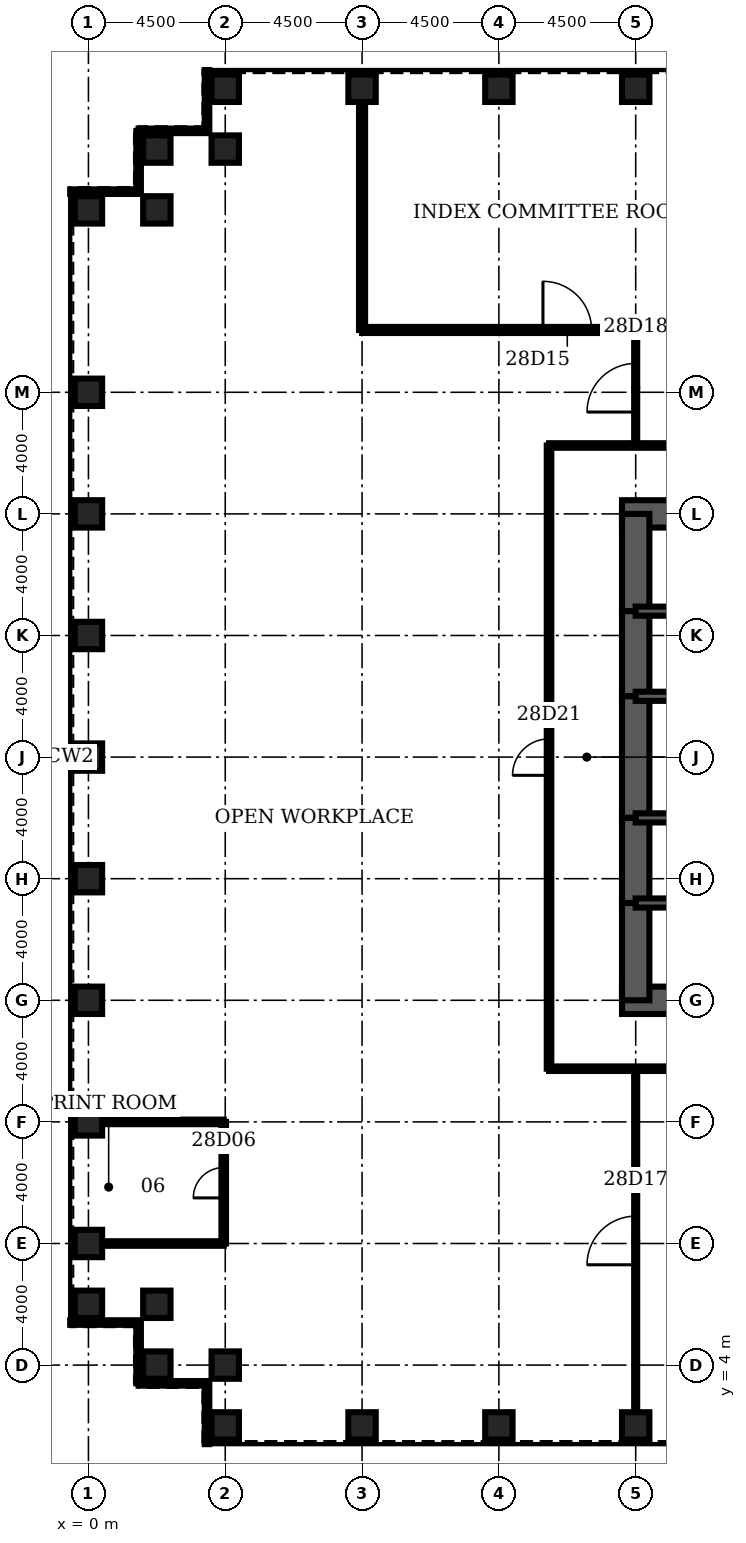
"""IFC4 building model, lengths in metres.
Left out: names, types, materials, properties, quantities, classifications, styles, units other than length and angle.
Written with IfcOpenShell. Run it as: python <this file> out.ifc"""

import sys

from ifc_helpers import new_model, si_unit, direction, frame, frame_2d, origin, origin_2d, place, context, subcontext, project, spatial, rectangle, hollow_rectangle, extrude, element, fill, save


model = new_model("IFC4")
c1 = context("Model", 3, precision=1e-05, world=origin(), true_north=direction((0.0, 1.0)))
c2 = subcontext(c1, "Body", "Model", "MODEL_VIEW")
j1 = project(units=[si_unit("LENGTHUNIT", "METRE"), si_unit("PLANEANGLEUNIT", "RADIAN")], contexts=[c1])
p1 = place(None, origin())
s1 = spatial("IfcSite", under=j1, at=p1, CompositionType="ELEMENT")
p2 = place(p1, origin())
s2 = spatial("IfcBuilding", under=s1, at=p2, CompositionType="ELEMENT")
p3 = place(p2, frame((0.0, 0.0, 129.9)))
s3 = spatial("IfcBuildingStorey", under=s2, at=p3, CompositionType="ELEMENT", Elevation=129.9)
for number, where, z_axis, x_axis in (
    (1, (4.5, 2.0, 0.0), (0.0, 0.0, 1.0), (0.0, 1.0, 0.0)),
    (2, (9.0, 2.0, 0.0), (0.0, 0.0, 1.0), (0.0, 1.0, 0.0)),
    (3, (13.5, 2.0, 0.0), (0.0, 0.0, 1.0), (0.0, 1.0, 0.0)),
    (4, (18.0, 2.0, 0.0), (0.0, 0.0, 1.0), (0.0, 1.0, 0.0)),
    (5, (18.0, 46.0, 0.0), (0.0, 0.0, 1.0), (0.0, 1.0, 0.0)),
    (6, (13.5, 46.0, 0.0), (0.0, 0.0, 1.0), (0.0, 1.0, 0.0)),
    (7, (9.0, 46.0, 0.0), (0.0, 0.0, 1.0), (0.0, 1.0, 0.0)),
    (8, (4.5, 46.0, 0.0), (0.0, 0.0, 1.0), (0.0, 1.0, 0.0)),
    (9, (4.5, 44.0, 0.0), (0.0, 0.0, 1.0), (0.0, 1.0, 0.0)),
    (10, (2.25, 44.0, 0.0), (0.0, 0.0, 1.0), (1.0, 0.0, 0.0)),
    (11, (2.25, 42.0, 0.0), (0.0, 0.0, 1.0), (1.0, 0.0, 0.0)),
    (12, (0.0, 42.0, 0.0), (0.0, 0.0, 1.0), (1.0, 0.0, 0.0)),
    (13, (0.0, 36.0, 0.0), (0.0, 0.0, 1.0), (1.0, 0.0, 0.0)),
    (14, (0.0, 32.0, 0.0), (0.0, 0.0, 1.0), (1.0, 0.0, 0.0)),
    (15, (0.0, 28.0, 0.0), (0.0, 0.0, 1.0), (1.0, 0.0, 0.0)),
    (16, (0.0, 24.0, 0.0), (0.0, 0.0, 1.0), (1.0, 0.0, 0.0)),
    (17, (0.0, 20.0, 0.0), (0.0, 0.0, 1.0), (1.0, 0.0, 0.0)),
    (18, (0.0, 16.0, 0.0), (0.0, 0.0, 1.0), (1.0, 0.0, 0.0)),
    (19, (0.0, 12.0, 0.0), (0.0, 0.0, 1.0), (1.0, 0.0, 0.0)),
    (20, (0.0, 8.0, 0.0), (0.0, 0.0, 1.0), (1.0, 0.0, 0.0)),
    (21, (0.0, 6.0, 0.0), (0.0, 0.0, 1.0), (1.0, 0.0, 0.0)),
    (22, (2.25, 6.0, 0.0), (0.0, 0.0, 1.0), (1.0, 0.0, 0.0)),
    (23, (2.25, 4.0, 0.0), (0.0, 0.0, 1.0), (1.0, 0.0, 0.0)),
    (24, (4.5, 4.0, 0.0), (0.0, 0.0, 1.0), (0.0, 1.0, 0.0)),
):
    element("IfcColumn", number, at=place(p3, frame(where, z_axis=z_axis, x_axis=x_axis)), inside=s3, PredefinedType="COLUMN", context=c2, shape_type="SweptSolid", body=[
        extrude(hollow_rectangle(XDim=0.9, YDim=0.9, WallThickness=0.1, at=origin_2d()), origin(), (0.0, 0.0, 1.0), 4.2),
    ])
for number, where, z_axis, x_axis in (
    (25, (17.55, 16.0, 0.0), (0.0, 0.0, 1.0), (1.0, 0.0, 0.0)),
    (26, (27.0, 32.0, 0.0), (0.0, 0.0, 1.0), (-1.0, 0.0, 0.0)),
):
    element("IfcWall", number, at=place(p3, frame(where, z_axis=z_axis, x_axis=x_axis)), inside=s3, PredefinedType="SHEAR", context=c2, shape_type="SweptSolid", body=[
        extrude(rectangle(XDim=9.45, YDim=0.9, at=frame_2d((4.725, 0.0))), origin(), (0.0, 0.0, 1.0), 4.2),
    ])
p4 = place(p3, frame((18.0, 32.0, 0.0), z_axis=(0.0, 0.0, 1.0), x_axis=(0.0, -1.0, 0.0)))
e27 = element("IfcWall", 27, at=p4, inside=s3, PredefinedType="SHEAR", context=c2, shape_type="SweptSolid", body=[
    extrude(rectangle(XDim=3.2, YDim=0.9, at=frame_2d((1.6, 0.0))), origin(), (0.0, 0.0, 1.0), 4.2),
])
p5 = place(p3, frame((18.0, 28.8, 0.0), z_axis=(0.0, 0.0, 1.0), x_axis=(0.0, -1.0, 0.0)))
e28 = element("IfcWall", 28, at=p5, inside=s3, PredefinedType="SHEAR", context=c2, shape_type="SweptSolid", body=[
    extrude(rectangle(XDim=2.8, YDim=0.9, at=frame_2d((1.4, 0.0))), origin(), (0.0, 0.0, 1.0), 4.2),
])
p6 = place(p5, frame((0.4, 0.0, 0.0)))
e29 = element("IfcOpeningElement", 29, at=p6, cuts=e28, PredefinedType="OPENING", context=c2, shape_type="SweptSolid", body=[
    extrude(rectangle(XDim=1.8, YDim=2.1, at=frame_2d((0.9, 1.05))), frame((0.0, 0.46, 0.0), z_axis=(0.0, -1.0, 0.0), x_axis=(1.0, 0.0, 0.0)), (0.0, 0.0, 1.0), 0.92),
])
p7 = place(p3, frame((18.0, 26.0, 0.0), z_axis=(0.0, 0.0, 1.0), x_axis=(0.0, -1.0, 0.0)))
e30 = element("IfcWall", 30, at=p7, inside=s3, PredefinedType="SHEAR", context=c2, shape_type="SweptSolid", body=[
    extrude(rectangle(XDim=4.0, YDim=0.9, at=frame_2d((2.0, 0.0))), origin(), (0.0, 0.0, 1.0), 4.2),
])
p8 = place(p3, frame((18.0, 22.0, 0.0), z_axis=(0.0, 0.0, 1.0), x_axis=(0.0, -1.0, 0.0)))
e31 = element("IfcWall", 31, at=p8, inside=s3, PredefinedType="SHEAR", context=c2, shape_type="SweptSolid", body=[
    extrude(rectangle(XDim=2.8, YDim=0.9, at=frame_2d((1.4, 0.0))), origin(), (0.0, 0.0, 1.0), 4.2),
])
p9 = place(p8, frame((0.6, 0.0, 0.0)))
e32 = element("IfcOpeningElement", 32, at=p9, cuts=e31, PredefinedType="OPENING", context=c2, shape_type="SweptSolid", body=[
    extrude(rectangle(XDim=1.8, YDim=2.1, at=frame_2d((0.9, 1.05))), frame((0.0, 0.46, 0.0), z_axis=(0.0, -1.0, 0.0), x_axis=(1.0, 0.0, 0.0)), (0.0, 0.0, 1.0), 0.92),
])
p10 = place(p3, frame((18.0, 19.2, 0.0), z_axis=(0.0, 0.0, 1.0), x_axis=(0.0, -1.0, 0.0)))
e33 = element("IfcWall", 33, at=p10, inside=s3, PredefinedType="SHEAR", context=c2, shape_type="SweptSolid", body=[
    extrude(rectangle(XDim=3.2, YDim=0.9, at=frame_2d((1.6, 0.0))), origin(), (0.0, 0.0, 1.0), 4.2),
])
p11 = place(p3, frame((18.0, 19.2, 0.0), z_axis=(0.0, 0.0, 1.0), x_axis=(1.0, 0.0, 0.0)))
e34 = element("IfcWall", 34, at=p11, inside=s3, PredefinedType="SOLIDWALL", context=c2, shape_type="SweptSolid", body=[
    extrude(rectangle(XDim=9.0, YDim=0.3, at=frame_2d((4.5, 0.0))), origin(), (0.0, 0.0, 1.0), 4.2),
])
p12 = place(p11, frame((0.65, 0.0, 0.0)))
e35 = element("IfcOpeningElement", 35, at=p12, cuts=e34, PredefinedType="OPENING", context=c2, shape_type="SweptSolid", body=[
    extrude(rectangle(XDim=1.0, YDim=2.1, at=frame_2d((0.5, 1.05))), frame((0.0, 0.16, 0.0), z_axis=(0.0, -1.0, 0.0), x_axis=(1.0, 0.0, 0.0)), (0.0, 0.0, 1.0), 0.32),
])
p13 = place(p3, frame((18.0, 28.8, 0.0), z_axis=(0.0, 0.0, 1.0), x_axis=(1.0, 0.0, 0.0)))
e36 = element("IfcWall", 36, at=p13, inside=s3, PredefinedType="SOLIDWALL", context=c2, shape_type="SweptSolid", body=[
    extrude(rectangle(XDim=9.0, YDim=0.3, at=frame_2d((4.5, 0.0))), origin(), (0.0, 0.0, 1.0), 4.2),
])
p14 = place(p13, frame((0.65, 0.0, 0.0)))
e37 = element("IfcOpeningElement", 37, at=p14, cuts=e36, PredefinedType="OPENING", context=c2, shape_type="SweptSolid", body=[
    extrude(rectangle(XDim=1.0, YDim=2.1, at=frame_2d((0.5, 1.05))), frame((0.0, 0.16, 0.0), z_axis=(0.0, -1.0, 0.0), x_axis=(1.0, 0.0, 0.0)), (0.0, 0.0, 1.0), 0.32),
])
p15 = place(p3, frame((18.0, 22.0, 0.0), z_axis=(0.0, 0.0, 1.0), x_axis=(1.0, 0.0, 0.0)))
e38 = element("IfcWall", 38, at=p15, inside=s3, PredefinedType="SOLIDWALL", context=c2, shape_type="SweptSolid", body=[
    extrude(rectangle(XDim=6.0, YDim=0.3, at=frame_2d((3.0, 0.0))), origin(), (0.0, 0.0, 1.0), 4.2),
])
p16 = place(p15, frame((2.0, 0.0, 0.0)))
e39 = element("IfcOpeningElement", 39, at=p16, cuts=e38, PredefinedType="OPENING", context=c2, shape_type="SweptSolid", body=[
    extrude(rectangle(XDim=1.0, YDim=2.1, at=frame_2d((0.5, 1.05))), frame((0.0, 0.16, 0.0), z_axis=(0.0, -1.0, 0.0), x_axis=(1.0, 0.0, 0.0)), (0.0, 0.0, 1.0), 0.32),
])
p17 = place(p3, frame((18.0, 26.0, 0.0), z_axis=(0.0, 0.0, 1.0), x_axis=(1.0, 0.0, 0.0)))
e40 = element("IfcWall", 40, at=p17, inside=s3, PredefinedType="SOLIDWALL", context=c2, shape_type="SweptSolid", body=[
    extrude(rectangle(XDim=6.0, YDim=0.3, at=frame_2d((3.0, 0.0))), origin(), (0.0, 0.0, 1.0), 4.2),
])
for number, where, z_axis, x_axis in (
    (41, (0.45, 8.0, 0.0), (0.0, 0.0, 1.0), (1.0, 0.0, 0.0)),
    (42, (0.45, 12.0, 0.0), (0.0, 0.0, 1.0), (1.0, 0.0, 0.0)),
):
    element("IfcWall", number, at=place(p3, frame(where, z_axis=z_axis, x_axis=x_axis)), inside=s3, PredefinedType="PARTITIONING", context=c2, shape_type="SweptSolid", body=[
        extrude(rectangle(XDim=4.0, YDim=0.15, at=frame_2d((2.0, 0.0))), origin(), (0.0, 0.0, 1.0), 3.0),
    ])
p18 = place(p3, frame((15.15, 13.75, 0.0), z_axis=(0.0, 0.0, 1.0), x_axis=(1.0, 0.0, 0.0)))
e43 = element("IfcWall", 43, at=p18, inside=s3, PredefinedType="PARTITIONING", context=c2, shape_type="SweptSolid", body=[
    extrude(rectangle(XDim=6.85, YDim=0.15, at=frame_2d((3.425, 0.0))), origin(), (0.0, 0.0, 1.0), 3.0),
])
p19 = place(p3, frame((15.15, 34.25, 0.0), z_axis=(0.0, 0.0, 1.0), x_axis=(1.0, 0.0, 0.0)))
e44 = element("IfcWall", 44, at=p19, inside=s3, PredefinedType="PARTITIONING", context=c2, shape_type="SweptSolid", body=[
    extrude(rectangle(XDim=41.7, YDim=0.15, at=frame_2d((20.85, 0.0))), origin(), (0.0, 0.0, 1.0), 3.0),
])
p20 = place(p19, frame((16.225, 0.0, 0.0)))
e45 = element("IfcOpeningElement", 45, at=p20, cuts=e44, PredefinedType="OPENING", context=c2, shape_type="SweptSolid", body=[
    extrude(rectangle(XDim=1.2, YDim=2.1, at=frame_2d((0.6, 1.05))), frame((0.0, 0.085, 0.0), z_axis=(0.0, -1.0, 0.0), x_axis=(1.0, 0.0, 0.0)), (0.0, 0.0, 1.0), 0.17),
])
p21 = place(p3, frame((9.0, 38.05, 0.0), z_axis=(0.0, 0.0, 1.0), x_axis=(1.0, 0.0, 0.0)))
e46 = element("IfcWall", 46, at=p21, inside=s3, PredefinedType="PARTITIONING", context=c2, shape_type="SweptSolid", body=[
    extrude(rectangle(XDim=13.5, YDim=0.2, at=frame_2d((6.75, 0.0))), origin(), (0.0, 0.0, 1.0), 3.0),
])
p22 = place(p21, frame((5.95, 0.0, 0.0)))
e47 = element("IfcOpeningElement", 47, at=p22, cuts=e46, PredefinedType="OPENING", context=c2, shape_type="SweptSolid", body=[
    extrude(rectangle(XDim=1.6, YDim=2.1, at=frame_2d((0.8, 1.05))), frame((0.0, 0.11, 0.0), z_axis=(0.0, -1.0, 0.0), x_axis=(1.0, 0.0, 0.0)), (0.0, 0.0, 1.0), 0.22),
])
p23 = place(p3, frame((4.45, 8.0, 0.0), z_axis=(0.0, 0.0, 1.0), x_axis=(0.0, 1.0, 0.0)))
e48 = element("IfcWall", 48, at=p23, inside=s3, PredefinedType="PARTITIONING", context=c2, shape_type="SweptSolid", body=[
    extrude(rectangle(XDim=4.0, YDim=0.15, at=frame_2d((2.0, 0.0))), origin(), (0.0, 0.0, 1.0), 3.0),
])
p24 = place(p23, frame((1.5, 0.0, 0.0)))
e49 = element("IfcOpeningElement", 49, at=p24, cuts=e48, PredefinedType="OPENING", context=c2, shape_type="SweptSolid", body=[
    extrude(rectangle(XDim=1.0, YDim=2.1, at=frame_2d((0.5, 1.05))), frame((0.0, 0.085, 0.0), z_axis=(0.0, -1.0, 0.0), x_axis=(1.0, 0.0, 0.0)), (0.0, 0.0, 1.0), 0.17),
])
p25 = place(p3, frame((9.0, 38.05, 0.0), z_axis=(0.0, 0.0, 1.0), x_axis=(0.0, 1.0, 0.0)))
e50 = element("IfcWall", 50, at=p25, inside=s3, PredefinedType="PARTITIONING", context=c2, shape_type="SweptSolid", body=[
    extrude(rectangle(XDim=7.5, YDim=0.2, at=frame_2d((3.75, 0.0))), origin(), (0.0, 0.0, 1.0), 3.0),
])
p26 = place(p3, frame((15.15, 13.75, 0.0), z_axis=(0.0, 0.0, 1.0), x_axis=(0.0, 1.0, 0.0)))
e51 = element("IfcWall", 51, at=p26, inside=s3, PredefinedType="PARTITIONING", context=c2, shape_type="SweptSolid", body=[
    extrude(rectangle(XDim=20.5, YDim=0.15, at=frame_2d((10.25, 0.0))), origin(), (0.0, 0.0, 1.0), 3.0),
])
p27 = place(p26, frame((9.65, 0.0, 0.0)))
e52 = element("IfcOpeningElement", 52, at=p27, cuts=e51, PredefinedType="OPENING", context=c2, shape_type="SweptSolid", body=[
    extrude(rectangle(XDim=1.2, YDim=2.1, at=frame_2d((0.6, 1.05))), frame((0.0, 0.085, 0.0), z_axis=(0.0, -1.0, 0.0), x_axis=(1.0, 0.0, 0.0)), (0.0, 0.0, 1.0), 0.17),
])
p28 = place(p3, frame((18.0, 2.45, 0.0), z_axis=(0.0, 0.0, 1.0), x_axis=(0.0, 1.0, 0.0)))
e53 = element("IfcWall", 53, at=p28, inside=s3, PredefinedType="PARTITIONING", context=c2, shape_type="SweptSolid", body=[
    extrude(rectangle(XDim=11.3, YDim=0.1, at=frame_2d((5.65, 0.0))), origin(), (0.0, 0.0, 1.0), 3.0),
])
p29 = place(p28, frame((4.85, 0.0, 0.0)))
e54 = element("IfcOpeningElement", 54, at=p29, cuts=e53, PredefinedType="OPENING", context=c2, shape_type="SweptSolid", body=[
    extrude(rectangle(XDim=1.6, YDim=2.1, at=frame_2d((0.8, 1.05))), frame((0.0, 0.06, 0.0), z_axis=(0.0, -1.0, 0.0), x_axis=(1.0, 0.0, 0.0)), (0.0, 0.0, 1.0), 0.12),
])
p30 = place(p3, frame((18.0, 34.25, 0.0), z_axis=(0.0, 0.0, 1.0), x_axis=(0.0, 1.0, 0.0)))
e55 = element("IfcWall", 55, at=p30, inside=s3, PredefinedType="PARTITIONING", context=c2, shape_type="SweptSolid", body=[
    extrude(rectangle(XDim=3.8, YDim=0.1, at=frame_2d((1.9, 0.0))), origin(), (0.0, 0.0, 1.0), 3.0),
])
p31 = place(p30, frame((1.1, 0.0, 0.0)))
e56 = element("IfcOpeningElement", 56, at=p31, cuts=e55, PredefinedType="OPENING", context=c2, shape_type="SweptSolid", body=[
    extrude(rectangle(XDim=1.6, YDim=2.1, at=frame_2d((0.8, 1.05))), frame((0.0, 0.06, 0.0), z_axis=(0.0, -1.0, 0.0), x_axis=(1.0, 0.0, 0.0)), (0.0, 0.0, 1.0), 0.12),
])
p32 = place(p3, frame((3.9, 46.6, 0.0), z_axis=(0.0, 0.0, 1.0), x_axis=(0.0, -1.0, 0.0)))
e57 = element("IfcWall", 57, at=p32, inside=s3, PredefinedType="ELEMENTEDWALL", context=c2, shape_type="SweptSolid", body=[
    extrude(rectangle(XDim=2.0, YDim=0.15, at=frame_2d((1.0, 0.0))), origin(), (0.0, 0.0, 1.0), 4.04),
])
p33 = place(p3, frame((3.9, 44.6, 0.0), z_axis=(0.0, 0.0, 1.0), x_axis=(-1.0, 0.0, 0.0)))
e58 = element("IfcWall", 58, at=p33, inside=s3, PredefinedType="ELEMENTEDWALL", context=c2, shape_type="SweptSolid", body=[
    extrude(rectangle(XDim=2.25, YDim=0.15, at=frame_2d((1.125, 0.0))), origin(), (0.0, 0.0, 1.0), 4.04),
])
p34 = place(p3, frame((1.65, 44.6, 0.0), z_axis=(0.0, 0.0, 1.0), x_axis=(0.0, -1.0, 0.0)))
e59 = element("IfcWall", 59, at=p34, inside=s3, PredefinedType="ELEMENTEDWALL", context=c2, shape_type="SweptSolid", body=[
    extrude(rectangle(XDim=2.0, YDim=0.15, at=frame_2d((1.0, 0.0))), origin(), (0.0, 0.0, 1.0), 4.04),
])
for number, where, z_axis, x_axis in (
    (60, (1.65, 42.6, 0.0), (0.0, 0.0, 1.0), (-1.0, 0.0, 0.0)),
    (61, (-0.6, 5.4, 0.0), (0.0, 0.0, 1.0), (1.0, 0.0, 0.0)),
):
    element("IfcWall", number, at=place(p3, frame(where, z_axis=z_axis, x_axis=x_axis)), inside=s3, PredefinedType="ELEMENTEDWALL", context=c2, shape_type="SweptSolid", body=[
        extrude(rectangle(XDim=2.25, YDim=0.15, at=frame_2d((1.125, 0.0))), origin(), (0.0, 0.0, 1.0), 4.04),
    ])
p35 = place(p3, frame((1.65, 5.4, 0.0), z_axis=(0.0, 0.0, 1.0), x_axis=(0.0, -1.0, 0.0)))
e62 = element("IfcWall", 62, at=p35, inside=s3, PredefinedType="ELEMENTEDWALL", context=c2, shape_type="SweptSolid", body=[
    extrude(rectangle(XDim=2.0, YDim=0.15, at=frame_2d((1.0, 0.0))), origin(), (0.0, 0.0, 1.0), 4.04),
])
p36 = place(p3, frame((1.65, 3.4, 0.0), z_axis=(0.0, 0.0, 1.0), x_axis=(1.0, 0.0, 0.0)))
e63 = element("IfcWall", 63, at=p36, inside=s3, PredefinedType="ELEMENTEDWALL", context=c2, shape_type="SweptSolid", body=[
    extrude(rectangle(XDim=2.25, YDim=0.15, at=frame_2d((1.125, 0.0))), origin(), (0.0, 0.0, 1.0), 4.04),
])
p37 = place(p3, frame((3.9, 3.4, 0.0), z_axis=(0.0, 0.0, 1.0), x_axis=(0.0, -1.0, 0.0)))
e64 = element("IfcWall", 64, at=p37, inside=s3, PredefinedType="ELEMENTEDWALL", context=c2, shape_type="SweptSolid", body=[
    extrude(rectangle(XDim=2.0, YDim=0.15, at=frame_2d((1.0, 0.0))), origin(), (0.0, 0.0, 1.0), 4.04),
])
p38 = place(p24, origin())
e65 = element("IfcDoor", 65, at=p38, inside=s3, OperationType="SINGLE_SWING_LEFT", PredefinedType="DOOR", context=c2, shape_type="SweptSolid", body=[
    extrude(rectangle(XDim=1.0, YDim=2.1, at=frame_2d((0.5, 1.05))), frame((0.0, 0.025, 0.0), z_axis=(0.0, -1.0, 0.0), x_axis=(1.0, 0.0, 0.0)), (0.0, 0.0, 1.0), 0.05),
])
fill(e49, e65)
p39 = place(p22, origin())
e66 = element("IfcDoor", 66, at=p39, inside=s3, OperationType="SINGLE_SWING_LEFT", PredefinedType="DOOR", context=c2, shape_type="SweptSolid", body=[
    extrude(rectangle(XDim=1.6, YDim=2.1, at=frame_2d((0.8, 1.05))), frame((0.0, 0.025, 0.0), z_axis=(0.0, -1.0, 0.0), x_axis=(1.0, 0.0, 0.0)), (0.0, 0.0, 1.0), 0.05),
])
fill(e47, e66)
p40 = place(p29, origin())
e67 = element("IfcDoor", 67, at=p40, inside=s3, OperationType="SINGLE_SWING_LEFT", PredefinedType="DOOR", context=c2, shape_type="SweptSolid", body=[
    extrude(rectangle(XDim=1.6, YDim=2.1, at=frame_2d((0.8, 1.05))), frame((0.0, 0.025, 0.0), z_axis=(0.0, -1.0, 0.0), x_axis=(1.0, 0.0, 0.0)), (0.0, 0.0, 1.0), 0.05),
])
fill(e54, e67)
p41 = place(p31, origin())
e68 = element("IfcDoor", 68, at=p41, inside=s3, OperationType="SINGLE_SWING_LEFT", PredefinedType="DOOR", context=c2, shape_type="SweptSolid", body=[
    extrude(rectangle(XDim=1.6, YDim=2.1, at=frame_2d((0.8, 1.05))), frame((0.0, 0.025, 0.0), z_axis=(0.0, -1.0, 0.0), x_axis=(1.0, 0.0, 0.0)), (0.0, 0.0, 1.0), 0.05),
])
fill(e56, e68)
p42 = place(p27, origin())
e69 = element("IfcDoor", 69, at=p42, inside=s3, OperationType="SINGLE_SWING_LEFT", PredefinedType="DOOR", context=c2, shape_type="SweptSolid", body=[
    extrude(rectangle(XDim=1.2, YDim=2.1, at=frame_2d((0.6, 1.05))), frame((0.0, 0.025, 0.0), z_axis=(0.0, -1.0, 0.0), x_axis=(1.0, 0.0, 0.0)), (0.0, 0.0, 1.0), 0.05),
])
fill(e52, e69)
p43 = place(p12, origin())
e70 = element("IfcDoor", 70, at=p43, inside=s3, OperationType="SINGLE_SWING_LEFT", PredefinedType="DOOR", context=c2, shape_type="SweptSolid", body=[
    extrude(rectangle(XDim=1.0, YDim=2.1, at=frame_2d((0.5, 1.05))), frame((0.0, 0.025, 0.0), z_axis=(0.0, -1.0, 0.0), x_axis=(1.0, 0.0, 0.0)), (0.0, 0.0, 1.0), 0.05),
])
fill(e35, e70)
p44 = place(p14, origin())
e71 = element("IfcDoor", 71, at=p44, inside=s3, OperationType="SINGLE_SWING_LEFT", PredefinedType="DOOR", context=c2, shape_type="SweptSolid", body=[
    extrude(rectangle(XDim=1.0, YDim=2.1, at=frame_2d((0.5, 1.05))), frame((0.0, 0.025, 0.0), z_axis=(0.0, -1.0, 0.0), x_axis=(1.0, 0.0, 0.0)), (0.0, 0.0, 1.0), 0.05),
])
fill(e37, e71)
p45 = place(p9, origin())
e72 = element("IfcDoor", 72, at=p45, inside=s3, OperationType="SINGLE_SWING_LEFT", PredefinedType="DOOR", context=c2, shape_type="SweptSolid", body=[
    extrude(rectangle(XDim=1.8, YDim=2.1, at=frame_2d((0.9, 1.05))), frame((0.0, 0.45, 0.0), z_axis=(0.0, -1.0, 0.0), x_axis=(1.0, 0.0, 0.0)), (0.0, 0.0, 1.0), 0.899),
])
fill(e32, e72)
p46 = place(p6, origin())
e73 = element("IfcDoor", 73, at=p46, inside=s3, OperationType="SINGLE_SWING_LEFT", PredefinedType="DOOR", context=c2, shape_type="SweptSolid", body=[
    extrude(rectangle(XDim=1.8, YDim=2.1, at=frame_2d((0.9, 1.05))), frame((0.0, 0.45, 0.0), z_axis=(0.0, -1.0, 0.0), x_axis=(1.0, 0.0, 0.0)), (0.0, 0.0, 1.0), 0.899),
])
fill(e29, e73)
save(model, sys.argv[1])
